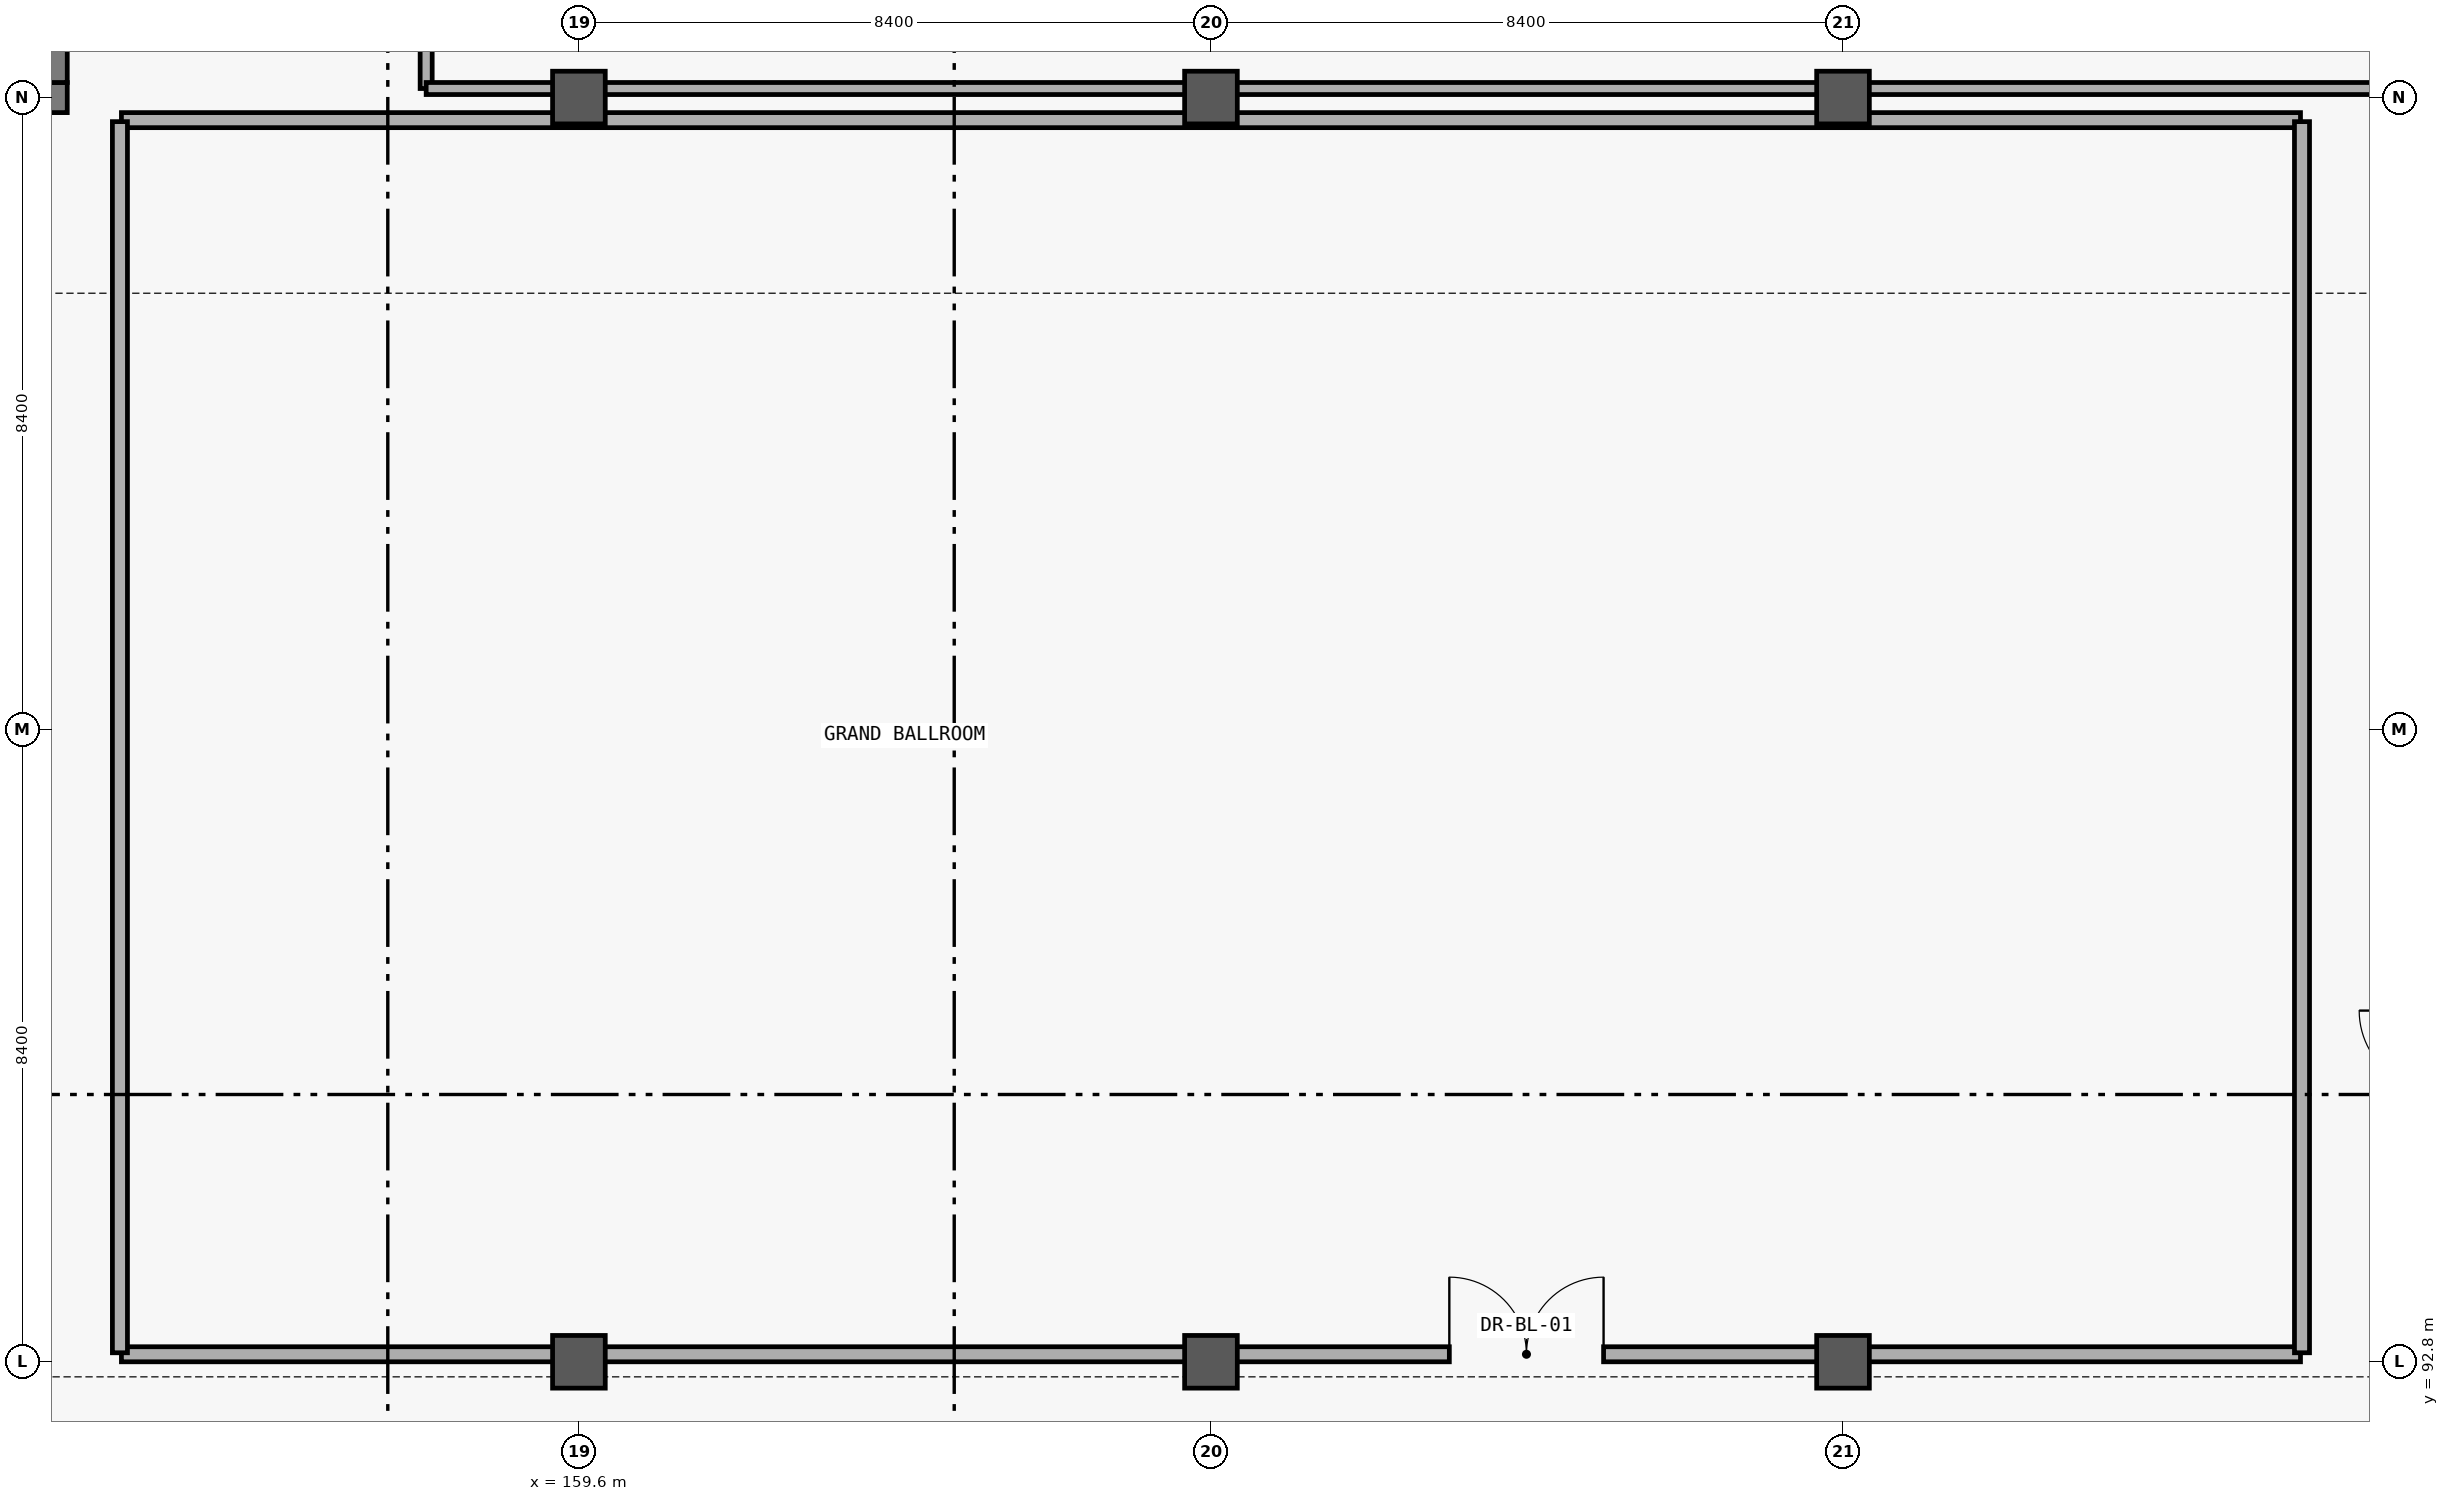
"""IFC4 building model, lengths in metres.
Left out: names, types, materials, properties, quantities, classifications, styles, units other than length and angle.
Written with IfcOpenShell. Run it as: python <this file> out.ifc"""

import sys

from ifc_helpers import new_model, si_unit, direction, frame, frame_2d, origin, origin_2d, place, context, subcontext, project, spatial, rectangle, extrude, element, fill, save


model = new_model("IFC4")
c1 = context("Model", 3, precision=1e-05, world=origin(), true_north=direction((0.0, 1.0)))
c2 = subcontext(c1, "Body", "Model", "MODEL_VIEW")
j1 = project(units=[si_unit("LENGTHUNIT", "METRE"), si_unit("PLANEANGLEUNIT", "RADIAN")], contexts=[c1])
p1 = place(None, origin())
s1 = spatial("IfcSite", under=j1, at=p1, CompositionType="ELEMENT")
p2 = place(p1, origin())
s2 = spatial("IfcBuilding", under=s1, at=p2, CompositionType="ELEMENT")
p3 = place(p2, origin())
s3 = spatial("IfcBuildingStorey", under=s2, at=p3, CompositionType="ELEMENT", Elevation=0.0)
for number, where, z_axis, x_axis in (
    (1, (159.6, 92.8, 0.0), (0.0, 0.0, 1.0), (1.0, 0.0, 0.0)),
    (2, (159.6, 109.6, 0.0), (0.0, 0.0, 1.0), (1.0, 0.0, 0.0)),
    (3, (168.0, 92.8, 0.0), (0.0, 0.0, 1.0), (1.0, 0.0, 0.0)),
    (4, (168.0, 109.6, 0.0), (0.0, 0.0, 1.0), (1.0, 0.0, 0.0)),
    (5, (176.4, 92.8, 0.0), (0.0, 0.0, 1.0), (1.0, 0.0, 0.0)),
    (6, (176.4, 109.6, 0.0), (0.0, 0.0, 1.0), (1.0, 0.0, 0.0)),
):
    element("IfcColumn", number, at=place(p3, frame(where, z_axis=z_axis, x_axis=x_axis)), inside=s3, PredefinedType="COLUMN", context=c2, shape_type="SweptSolid", body=[
        extrude(rectangle(XDim=0.7, YDim=0.7, at=origin_2d()), origin(), (0.0, 0.0, 1.0), 5.4),
    ])
p4 = place(p3, frame((143.6, 109.6, 0.0), z_axis=(0.0, 0.0, 1.0), x_axis=(1.0, 0.0, 0.0)))
e7 = element("IfcWall", 7, at=p4, inside=s3, PredefinedType="SHEAR", context=c2, shape_type="SweptSolid", body=[
    extrude(rectangle(XDim=9.2, YDim=0.4, at=frame_2d((4.6, 0.0))), origin(), (0.0, 0.0, 1.0), 5.08),
])
p5 = place(p4, frame((1.1, 0.0, 0.0)))
e8 = element("IfcOpeningElement", 8, at=p5, cuts=e7, PredefinedType="OPENING", context=c2, shape_type="SweptSolid", body=[
    extrude(rectangle(XDim=1.1, YDim=2.2, at=frame_2d((0.55, 1.1))), frame((0.0, 0.21, 0.0), z_axis=(0.0, -1.0, 0.0), x_axis=(1.0, 0.0, 0.0)), (0.0, 0.0, 1.0), 0.42),
])
p6 = place(p3, frame((152.6, 109.8, 0.0), z_axis=(0.0, 0.0, 1.0), x_axis=(0.0, 1.0, 0.0)))
e9 = element("IfcWall", 9, at=p6, inside=s3, PredefinedType="SHEAR", context=c2, shape_type="SweptSolid", body=[
    extrude(rectangle(XDim=7.4, YDim=0.4, at=frame_2d((3.7, 0.0))), origin(), (0.0, 0.0, 1.0), 5.08),
])
p7 = place(p6, frame((5.9, 0.0, 0.0)))
e10 = element("IfcOpeningElement", 10, at=p7, cuts=e9, PredefinedType="OPENING", context=c2, shape_type="SweptSolid", body=[
    extrude(rectangle(XDim=1.15, YDim=2.2, at=frame_2d((0.575, 1.1))), frame((0.0, 0.21, 0.0), z_axis=(0.0, -1.0, 0.0), x_axis=(1.0, 0.0, 0.0)), (0.0, 0.0, 1.0), 0.42),
])
p8 = place(p3, frame((153.52, 92.9, 0.0), z_axis=(0.0, 0.0, 1.0), x_axis=(1.0, 0.0, 0.0)))
e11 = element("IfcWall", 11, at=p8, inside=s3, PredefinedType="SOLIDWALL", context=c2, shape_type="SweptSolid", body=[
    extrude(rectangle(XDim=28.96, YDim=0.2, at=frame_2d((14.48, 0.0))), origin(), (0.0, 0.0, 1.0), 4.18),
])
p9 = place(p8, frame((17.648, 0.0, 0.0)))
e12 = element("IfcOpeningElement", 12, at=p9, cuts=e11, PredefinedType="OPENING", context=c2, shape_type="SweptSolid", body=[
    extrude(rectangle(XDim=2.05, YDim=2.55, at=frame_2d((1.025, 1.275))), frame((0.0, 0.11, 0.0), z_axis=(0.0, -1.0, 0.0), x_axis=(1.0, 0.0, 0.0)), (0.0, 0.0, 1.0), 0.22),
])
p10 = place(p3, frame((157.57, 109.72, 0.0), z_axis=(0.0, 0.0, 1.0), x_axis=(0.0, 1.0, 0.0)))
e13 = element("IfcWall", 13, at=p10, inside=s3, PredefinedType="PARTITIONING", context=c2, shape_type="SweptSolid", body=[
    extrude(rectangle(XDim=7.94, YDim=0.16, at=frame_2d((3.97, 0.0))), origin(), (0.0, 0.0, 1.0), 4.18),
])
p11 = place(p10, frame((0.814, 0.0, 0.0)))
e14 = element("IfcOpeningElement", 14, at=p11, cuts=e13, PredefinedType="OPENING", context=c2, shape_type="SweptSolid", body=[
    extrude(rectangle(XDim=1.55, YDim=2.25, at=frame_2d((0.775, 1.125))), frame((0.0, 0.09, 0.0), z_axis=(0.0, -1.0, 0.0), x_axis=(1.0, 0.0, 0.0)), (0.0, 0.0, 1.0), 0.18),
])
p12 = place(p3, frame((153.52, 109.3, 0.0), z_axis=(0.0, 0.0, 1.0), x_axis=(1.0, 0.0, 0.0)))
e15 = element("IfcWall", 15, at=p12, inside=s3, PredefinedType="SOLIDWALL", context=c2, shape_type="SweptSolid", body=[
    extrude(rectangle(XDim=28.96, YDim=0.2, at=frame_2d((14.48, 0.0))), origin(), (0.0, 0.0, 1.0), 4.18),
])
for number, where, z_axis, x_axis in (
    (16, (153.5, 92.92, 0.0), (0.0, 0.0, 1.0), (0.0, 1.0, 0.0)),
    (17, (182.5, 92.92, 0.0), (0.0, 0.0, 1.0), (0.0, 1.0, 0.0)),
):
    element("IfcWall", number, at=place(p3, frame(where, z_axis=z_axis, x_axis=x_axis)), inside=s3, PredefinedType="SOLIDWALL", context=c2, shape_type="SweptSolid", body=[
        extrude(rectangle(XDim=16.36, YDim=0.2, at=frame_2d((8.18, 0.0))), origin(), (0.0, 0.0, 1.0), 4.18),
    ])
p13 = place(p3, frame((157.57, 109.72, 0.0), z_axis=(0.0, 0.0, 1.0), x_axis=(1.0, 0.0, 0.0)))
e18 = element("IfcWall", 18, at=p13, inside=s3, PredefinedType="PARTITIONING", context=c2, shape_type="SweptSolid", body=[
    extrude(rectangle(XDim=26.51, YDim=0.16, at=frame_2d((13.255, 0.0))), origin(), (0.0, 0.0, 1.0), 4.18),
])
p14 = place(p9, origin())
e19 = element("IfcDoor", 19, at=p14, inside=s3, OperationType="DOUBLE_DOOR_SINGLE_SWING", PredefinedType="DOOR", context=c2, shape_type="SweptSolid", body=[
    extrude(rectangle(XDim=2.05, YDim=2.55, at=frame_2d((1.025, 1.275))), frame((0.0, 0.025, 0.0), z_axis=(0.0, -1.0, 0.0), x_axis=(1.0, 0.0, 0.0)), (0.0, 0.0, 1.0), 0.05),
])
fill(e12, e19)
save(model, sys.argv[1])
